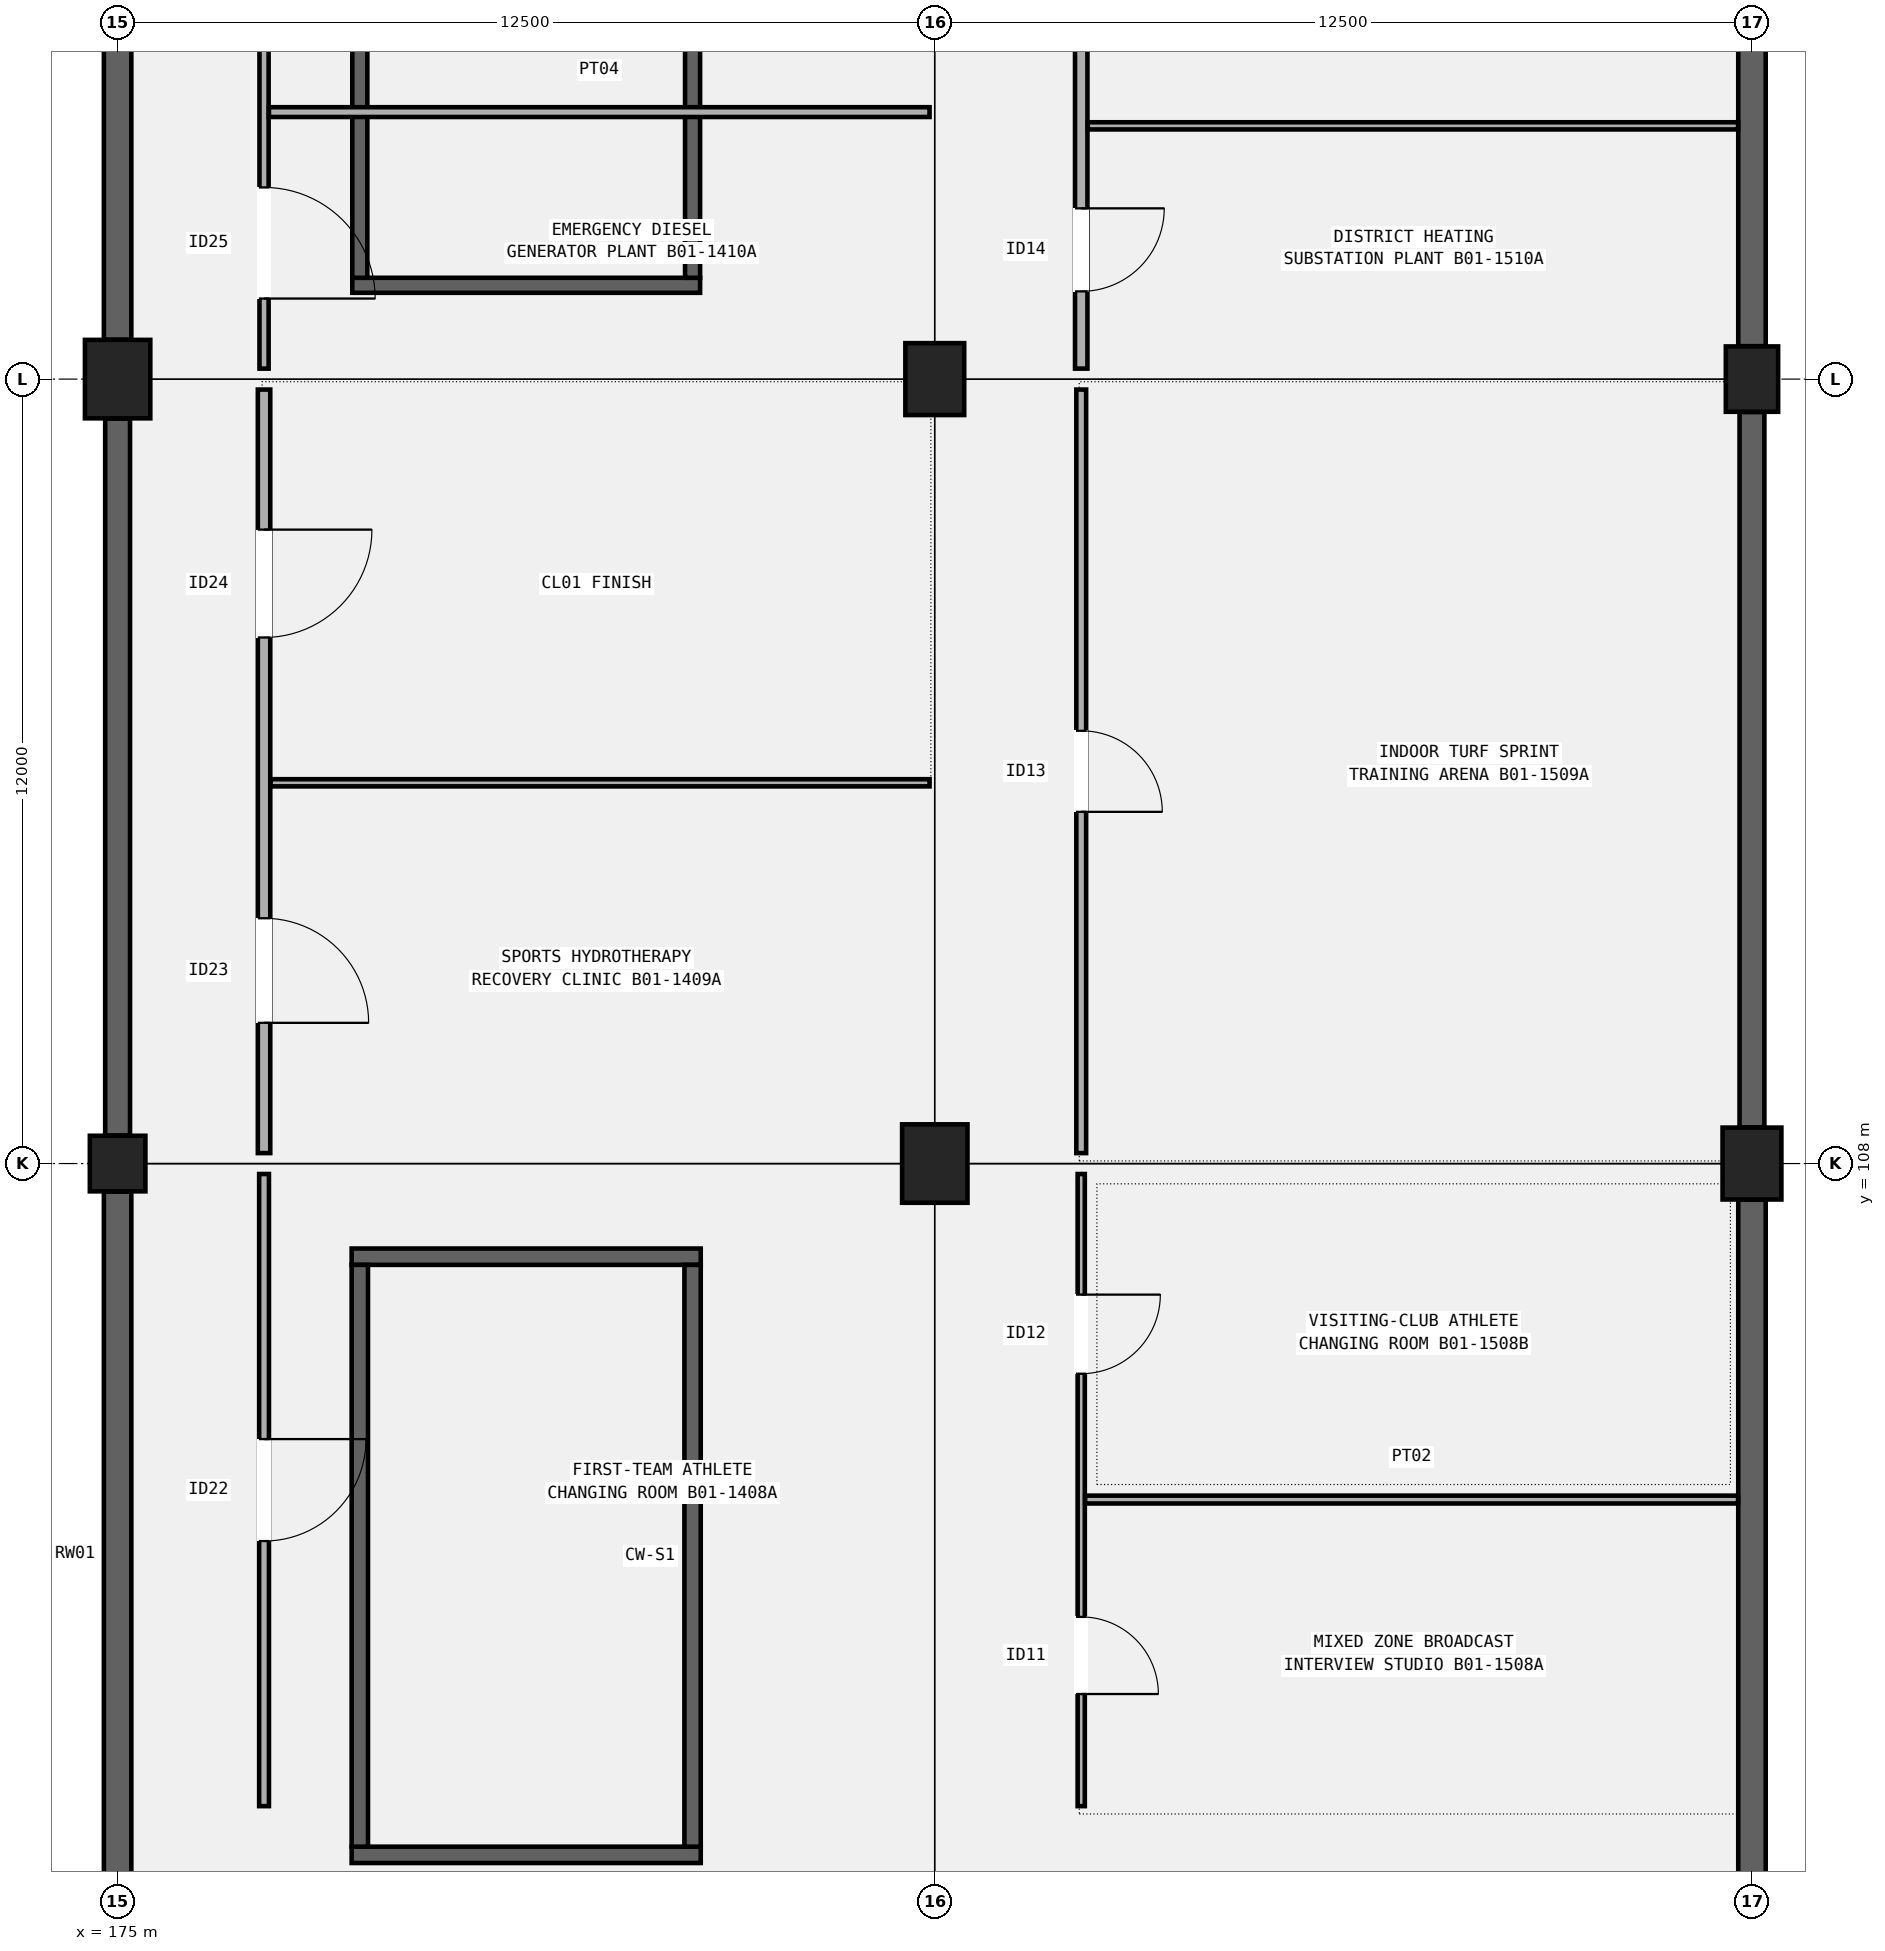
"""IFC4 building model, lengths in metres.
Left out: names, types, materials, properties, quantities, classifications, styles, units other than length and angle.
Written with IfcOpenShell. Run it as: python <this file> out.ifc"""

import sys

from ifc_helpers import new_model, si_unit, direction, frame, frame_2d, origin, origin_2d, place, context, subcontext, project, spatial, rectangle, circle, extrude, element, fill, save


model = new_model("IFC4")
c1 = context("Model", 3, precision=1e-05, world=origin(), true_north=direction((0.0, 1.0)))
c2 = subcontext(c1, "Body", "Model", "MODEL_VIEW")
j1 = project(units=[si_unit("LENGTHUNIT", "METRE"), si_unit("PLANEANGLEUNIT", "RADIAN")], contexts=[c1])
p1 = place(None, origin())
s1 = spatial("IfcSite", under=j1, at=p1, CompositionType="ELEMENT")
p2 = place(p1, origin())
s2 = spatial("IfcBuilding", under=s1, at=p2, CompositionType="ELEMENT")
p3 = place(p2, frame((0.0, 0.0, -4.8)))
s3 = spatial("IfcBuildingStorey", under=s2, at=p3, CompositionType="ELEMENT", Elevation=-4.8)
p4 = place(p3, frame((175.0, 108.0, 0.0), z_axis=(0.0, 0.0, 1.0), x_axis=(1.0, 0.0, 0.0)))
e1 = element("IfcColumn", 1, at=p4, inside=s3, PredefinedType="COLUMN", context=c2, shape_type="SweptSolid", body=[
    extrude(circle(Radius=0.425, at=origin_2d()), origin(), (0.0, 0.0, 1.0), 4.8),
])
for number, where, z_axis, x_axis in (
    (2, (175.0, 120.0, 0.0), (0.0, 0.0, 1.0), (1.0, 0.0, 0.0)),
    (3, (187.5, 108.0, 0.0), (0.0, 0.0, 1.0), (1.0, 0.0, 0.0)),
):
    element("IfcColumn", number, at=place(p3, frame(where, z_axis=z_axis, x_axis=x_axis)), inside=s3, PredefinedType="COLUMN", context=c2, shape_type="SweptSolid", body=[
        extrude(rectangle(XDim=1.0, YDim=1.2, at=origin_2d()), origin(), (0.0, 0.0, 1.0), 4.8),
    ])
for number, where, z_axis, x_axis in (
    (4, (187.5, 120.0, 0.0), (0.0, 0.0, 1.0), (1.0, 0.0, 0.0)),
    (5, (200.0, 108.0, 0.0), (0.0, 0.0, 1.0), (1.0, 0.0, 0.0)),
):
    element("IfcColumn", number, at=place(p3, frame(where, z_axis=z_axis, x_axis=x_axis)), inside=s3, PredefinedType="COLUMN", context=c2, shape_type="SweptSolid", body=[
        extrude(rectangle(XDim=0.9, YDim=1.1, at=origin_2d()), origin(), (0.0, 0.0, 1.0), 4.8),
    ])
p5 = place(p3, frame((200.0, 120.0, 0.0), z_axis=(0.0, 0.0, 1.0), x_axis=(1.0, 0.0, 0.0)))
e6 = element("IfcColumn", 6, at=p5, inside=s3, PredefinedType="COLUMN", context=c2, shape_type="SweptSolid", body=[
    extrude(rectangle(XDim=0.8, YDim=1.0, at=origin_2d()), origin(), (0.0, 0.0, 1.0), 4.8),
])
p6 = place(p3, frame((175.0, 96.504, 0.0), z_axis=(0.0, 0.0, 1.0), x_axis=(0.0, 1.0, 0.0)))
e7 = element("IfcWall", 7, at=p6, inside=s3, PredefinedType="STANDARD", context=c2, shape_type="SweptSolid", body=[
    extrude(rectangle(XDim=11.067, YDim=0.42, at=frame_2d((5.534, 0.0))), origin(), (0.0, 0.0, 1.0), 4.46),
])
p7 = place(p3, frame((175.0, 108.429, 0.0), z_axis=(0.0, 0.0, 1.0), x_axis=(0.0, 1.0, 0.0)))
e8 = element("IfcWall", 8, at=p7, inside=s3, PredefinedType="STANDARD", context=c2, shape_type="SweptSolid", body=[
    extrude(rectangle(XDim=10.967, YDim=0.38, at=frame_2d((5.483, 0.0))), origin(), (0.0, 0.0, 1.0), 4.46),
])
for number, where, z_axis, x_axis in (
    (9, (175.0, 120.604, 0.0), (0.0, 0.0, 1.0), (0.0, 1.0, 0.0)),
    (10, (200.0, 96.604, 0.0), (0.0, 0.0, 1.0), (0.0, 1.0, 0.0)),
):
    element("IfcWall", number, at=place(p3, frame(where, z_axis=z_axis, x_axis=x_axis)), inside=s3, PredefinedType="STANDARD", context=c2, shape_type="SweptSolid", body=[
        extrude(rectangle(XDim=10.842, YDim=0.42, at=frame_2d((5.421, 0.0))), origin(), (0.0, 0.0, 1.0), 4.46),
    ])
p8 = place(p3, frame((200.0, 108.554, 0.0), z_axis=(0.0, 0.0, 1.0), x_axis=(0.0, 1.0, 0.0)))
e11 = element("IfcWall", 11, at=p8, inside=s3, PredefinedType="STANDARD", context=c2, shape_type="SweptSolid", body=[
    extrude(rectangle(XDim=10.942, YDim=0.38, at=frame_2d((5.471, 0.0))), origin(), (0.0, 0.0, 1.0), 4.46),
])
p9 = place(p3, frame((200.0, 120.504, 0.0), z_axis=(0.0, 0.0, 1.0), x_axis=(0.0, 1.0, 0.0)))
e12 = element("IfcWall", 12, at=p9, inside=s3, PredefinedType="STANDARD", context=c2, shape_type="SweptSolid", body=[
    extrude(rectangle(XDim=11.067, YDim=0.42, at=frame_2d((5.534, 0.0))), origin(), (0.0, 0.0, 1.0), 4.46),
])
for number, where, z_axis, x_axis in (
    (13, (178.58, 97.425, 0.0), (0.0, 0.0, 1.0), (1.0, 0.0, 0.0)),
    (14, (178.58, 106.575, 0.0), (0.0, 0.0, 1.0), (1.0, 0.0, 0.0)),
):
    element("IfcWall", number, at=place(p3, frame(where, z_axis=z_axis, x_axis=x_axis)), inside=s3, PredefinedType="SHEAR", context=c2, shape_type="SweptSolid", body=[
        extrude(rectangle(XDim=5.34, YDim=0.25, at=frame_2d((2.67, 0.0))), origin(), (0.0, 0.0, 1.0), 4.5),
    ])
for number, where, z_axis, x_axis in (
    (15, (178.705, 97.55, 0.0), (0.0, 0.0, 1.0), (0.0, 1.0, 0.0)),
    (16, (183.795, 97.55, 0.0), (0.0, 0.0, 1.0), (0.0, 1.0, 0.0)),
):
    element("IfcWall", number, at=place(p3, frame(where, z_axis=z_axis, x_axis=x_axis)), inside=s3, PredefinedType="SHEAR", context=c2, shape_type="SweptSolid", body=[
        extrude(rectangle(XDim=8.9, YDim=0.25, at=frame_2d((4.45, 0.0))), origin(), (0.0, 0.0, 1.0), 4.5),
    ])
p10 = place(p3, frame((178.59, 121.435, 0.0), z_axis=(0.0, 0.0, 1.0), x_axis=(1.0, 0.0, 0.0)))
e17 = element("IfcWall", 17, at=p10, inside=s3, PredefinedType="SHEAR", context=c2, shape_type="SweptSolid", body=[
    extrude(rectangle(XDim=5.32, YDim=0.23, at=frame_2d((2.66, 0.0))), origin(), (0.0, 0.0, 1.0), 4.5),
])
for number, where, z_axis, x_axis in (
    (18, (178.705, 121.55, 0.0), (0.0, 0.0, 1.0), (0.0, 1.0, 0.0)),
    (19, (183.795, 121.55, 0.0), (0.0, 0.0, 1.0), (0.0, 1.0, 0.0)),
):
    element("IfcWall", number, at=place(p3, frame(where, z_axis=z_axis, x_axis=x_axis)), inside=s3, PredefinedType="SHEAR", context=c2, shape_type="SweptSolid", body=[
        extrude(rectangle(XDim=8.9, YDim=0.23, at=frame_2d((4.45, 0.0))), origin(), (0.0, 0.0, 1.0), 4.5),
    ])
p11 = place(p3, frame((177.24, 98.17, 0.0), z_axis=(0.0, 0.0, 1.0), x_axis=(0.0, 1.0, 0.0)))
e20 = element("IfcWall", 20, at=p11, inside=s3, PredefinedType="PARTITIONING", context=c2, shape_type="SweptSolid", body=[
    extrude(rectangle(XDim=9.67, YDim=0.15, at=frame_2d((4.835, 0.0))), origin(), (0.0, 0.0, 1.0), 3.92),
])
p12 = place(p11, frame((5.615, 0.0, 0.0), z_axis=(0.0, 0.0, 1.0), x_axis=(-1.0, 0.0, 0.0)))
e21 = element("IfcOpeningElement", 21, at=p12, cuts=e20, PredefinedType="OPENING", context=c2, shape_type="SweptSolid", body=[
    extrude(rectangle(XDim=1.56, YDim=2.26, at=frame_2d((0.78, 1.13))), frame((0.0, 0.085, 0.0), z_axis=(0.0, -1.0, 0.0), x_axis=(1.0, 0.0, 0.0)), (0.0, 0.0, 1.0), 0.17),
])
p13 = place(p3, frame((177.24, 108.16, 0.0), z_axis=(0.0, 0.0, 1.0), x_axis=(0.0, 1.0, 0.0)))
e22 = element("IfcWall", 22, at=p13, inside=s3, PredefinedType="PARTITIONING", context=c2, shape_type="SweptSolid", body=[
    extrude(rectangle(XDim=11.68, YDim=0.19, at=frame_2d((5.84, 0.0))), origin(), (0.0, 0.0, 1.0), 3.92),
])
p14 = place(p13, frame((3.593, 0.0, 0.0), z_axis=(0.0, 0.0, 1.0), x_axis=(-1.0, 0.0, 0.0)))
e23 = element("IfcOpeningElement", 23, at=p14, cuts=e22, PredefinedType="OPENING", context=c2, shape_type="SweptSolid", body=[
    extrude(rectangle(XDim=1.6, YDim=2.3, at=frame_2d((0.8, 1.15))), frame((0.0, 0.105, 0.0), z_axis=(0.0, -1.0, 0.0), x_axis=(1.0, 0.0, 0.0)), (0.0, 0.0, 1.0), 0.21),
])
p15 = place(p13, frame((9.537, 0.0, 0.0), z_axis=(0.0, 0.0, 1.0), x_axis=(-1.0, 0.0, 0.0)))
e24 = element("IfcOpeningElement", 24, at=p15, cuts=e22, PredefinedType="OPENING", context=c2, shape_type="SweptSolid", body=[
    extrude(rectangle(XDim=1.65, YDim=2.28, at=frame_2d((0.825, 1.14))), frame((0.0, 0.105, 0.0), z_axis=(0.0, -1.0, 0.0), x_axis=(1.0, 0.0, 0.0)), (0.0, 0.0, 1.0), 0.21),
])
p16 = place(p3, frame((177.34, 113.825, 0.0), z_axis=(0.0, 0.0, 1.0), x_axis=(1.0, 0.0, 0.0)))
e25 = element("IfcWall", 25, at=p16, inside=s3, PredefinedType="PARTITIONING", context=c2, shape_type="SweptSolid", body=[
    extrude(rectangle(XDim=10.08, YDim=0.11, at=frame_2d((5.04, 0.0))), origin(), (0.0, 0.0, 1.0), 3.92),
])
p17 = place(p3, frame((177.24, 120.16, 0.0), z_axis=(0.0, 0.0, 1.0), x_axis=(0.0, 1.0, 0.0)))
e26 = element("IfcWall", 26, at=p17, inside=s3, PredefinedType="PARTITIONING", context=c2, shape_type="SweptSolid", body=[
    extrude(rectangle(XDim=11.68, YDim=0.14, at=frame_2d((5.84, 0.0))), origin(), (0.0, 0.0, 1.0), 3.92),
])
p18 = place(p17, frame((2.772, 0.0, 0.0), z_axis=(0.0, 0.0, 1.0), x_axis=(-1.0, 0.0, 0.0)))
e27 = element("IfcOpeningElement", 27, at=p18, cuts=e26, PredefinedType="OPENING", context=c2, shape_type="SweptSolid", body=[
    extrude(rectangle(XDim=1.7, YDim=2.32, at=frame_2d((0.85, 1.16))), frame((0.0, 0.08, 0.0), z_axis=(0.0, -1.0, 0.0), x_axis=(1.0, 0.0, 0.0)), (0.0, 0.0, 1.0), 0.16),
])
p19 = place(p17, frame((8.722, 0.0, 0.0), z_axis=(0.0, 0.0, 1.0), x_axis=(-1.0, 0.0, 0.0)))
e28 = element("IfcOpeningElement", 28, at=p19, cuts=e26, PredefinedType="OPENING", context=c2, shape_type="SweptSolid", body=[
    extrude(rectangle(XDim=1.76, YDim=2.3, at=frame_2d((0.88, 1.15))), frame((0.0, 0.08, 0.0), z_axis=(0.0, -1.0, 0.0), x_axis=(1.0, 0.0, 0.0)), (0.0, 0.0, 1.0), 0.16),
])
p20 = place(p3, frame((177.315, 124.084, 0.0), z_axis=(0.0, 0.0, 1.0), x_axis=(1.0, 0.0, 0.0)))
e29 = element("IfcWall", 29, at=p20, inside=s3, PredefinedType="PARTITIONING", context=c2, shape_type="SweptSolid", body=[
    extrude(rectangle(XDim=10.105, YDim=0.15, at=frame_2d((5.052, 0.0))), origin(), (0.0, 0.0, 1.0), 3.92),
])
p21 = place(p3, frame((189.74, 98.17, 0.0), z_axis=(0.0, 0.0, 1.0), x_axis=(0.0, 1.0, 0.0)))
e30 = element("IfcWall", 30, at=p21, inside=s3, PredefinedType="PARTITIONING", context=c2, shape_type="SweptSolid", body=[
    extrude(rectangle(XDim=9.67, YDim=0.11, at=frame_2d((4.835, 0.0))), origin(), (0.0, 0.0, 1.0), 3.92),
])
p22 = place(p21, frame((2.895, 0.0, 0.0), z_axis=(0.0, 0.0, 1.0), x_axis=(-1.0, 0.0, 0.0)))
e31 = element("IfcOpeningElement", 31, at=p22, cuts=e30, PredefinedType="OPENING", context=c2, shape_type="SweptSolid", body=[
    extrude(rectangle(XDim=1.18, YDim=2.2, at=frame_2d((0.59, 1.1))), frame((0.0, 0.065, 0.0), z_axis=(0.0, -1.0, 0.0), x_axis=(1.0, 0.0, 0.0)), (0.0, 0.0, 1.0), 0.13),
])
p23 = place(p21, frame((7.825, 0.0, 0.0), z_axis=(0.0, 0.0, 1.0), x_axis=(-1.0, 0.0, 0.0)))
e32 = element("IfcOpeningElement", 32, at=p23, cuts=e30, PredefinedType="OPENING", context=c2, shape_type="SweptSolid", body=[
    extrude(rectangle(XDim=1.21, YDim=2.18, at=frame_2d((0.605, 1.09))), frame((0.0, 0.065, 0.0), z_axis=(0.0, -1.0, 0.0), x_axis=(1.0, 0.0, 0.0)), (0.0, 0.0, 1.0), 0.13),
])
p24 = place(p3, frame((189.8, 102.86, 0.0), z_axis=(0.0, 0.0, 1.0), x_axis=(1.0, 0.0, 0.0)))
e33 = element("IfcWall", 33, at=p24, inside=s3, PredefinedType="PARTITIONING", context=c2, shape_type="SweptSolid", body=[
    extrude(rectangle(XDim=9.988, YDim=0.12, at=frame_2d((4.994, 0.0))), origin(), (0.0, 0.0, 1.0), 3.92),
])
p25 = place(p3, frame((189.74, 108.16, 0.0), z_axis=(0.0, 0.0, 1.0), x_axis=(0.0, 1.0, 0.0)))
e34 = element("IfcWall", 34, at=p25, inside=s3, PredefinedType="PARTITIONING", context=c2, shape_type="SweptSolid", body=[
    extrude(rectangle(XDim=11.68, YDim=0.15, at=frame_2d((5.84, 0.0))), origin(), (0.0, 0.0, 1.0), 3.92),
])
p26 = place(p25, frame((6.46, 0.0, 0.0), z_axis=(0.0, 0.0, 1.0), x_axis=(-1.0, 0.0, 0.0)))
e35 = element("IfcOpeningElement", 35, at=p26, cuts=e34, PredefinedType="OPENING", context=c2, shape_type="SweptSolid", body=[
    extrude(rectangle(XDim=1.24, YDim=2.22, at=frame_2d((0.62, 1.11))), frame((0.0, 0.085, 0.0), z_axis=(0.0, -1.0, 0.0), x_axis=(1.0, 0.0, 0.0)), (0.0, 0.0, 1.0), 0.17),
])
p27 = place(p3, frame((189.74, 120.16, 0.0), z_axis=(0.0, 0.0, 1.0), x_axis=(0.0, 1.0, 0.0)))
e36 = element("IfcWall", 36, at=p27, inside=s3, PredefinedType="PARTITIONING", context=c2, shape_type="SweptSolid", body=[
    extrude(rectangle(XDim=11.68, YDim=0.19, at=frame_2d((5.84, 0.0))), origin(), (0.0, 0.0, 1.0), 3.92),
])
p28 = place(p27, frame((2.452, 0.0, 0.0), z_axis=(0.0, 0.0, 1.0), x_axis=(-1.0, 0.0, 0.0)))
e37 = element("IfcOpeningElement", 37, at=p28, cuts=e36, PredefinedType="OPENING", context=c2, shape_type="SweptSolid", body=[
    extrude(rectangle(XDim=1.27, YDim=2.2, at=frame_2d((0.635, 1.1))), frame((0.0, 0.105, 0.0), z_axis=(0.0, -1.0, 0.0), x_axis=(1.0, 0.0, 0.0)), (0.0, 0.0, 1.0), 0.21),
])
p29 = place(p27, frame((8.387, 0.0, 0.0), z_axis=(0.0, 0.0, 1.0), x_axis=(-1.0, 0.0, 0.0)))
e38 = element("IfcOpeningElement", 38, at=p29, cuts=e36, PredefinedType="OPENING", context=c2, shape_type="SweptSolid", body=[
    extrude(rectangle(XDim=1.3, YDim=2.24, at=frame_2d((0.65, 1.12))), frame((0.0, 0.105, 0.0), z_axis=(0.0, -1.0, 0.0), x_axis=(1.0, 0.0, 0.0)), (0.0, 0.0, 1.0), 0.21),
])
p30 = place(p3, frame((189.84, 123.874, 0.0), z_axis=(0.0, 0.0, 1.0), x_axis=(1.0, 0.0, 0.0)))
e39 = element("IfcWall", 39, at=p30, inside=s3, PredefinedType="PARTITIONING", context=c2, shape_type="SweptSolid", body=[
    extrude(rectangle(XDim=9.948, YDim=0.11, at=frame_2d((4.974, 0.0))), origin(), (0.0, 0.0, 1.0), 3.92),
])
p31 = place(p12, origin())
e40 = element("IfcDoor", 40, at=p31, inside=s3, OperationType="SINGLE_SWING_LEFT", PredefinedType="DOOR", context=c2, shape_type="SweptSolid", body=[
    extrude(rectangle(XDim=1.56, YDim=2.26, at=frame_2d((0.78, 1.13))), frame((0.0, 0.025, 0.0), z_axis=(0.0, -1.0, 0.0), x_axis=(1.0, 0.0, 0.0)), (0.0, 0.0, 1.0), 0.05),
])
fill(e21, e40)
p32 = place(p14, origin())
e41 = element("IfcDoor", 41, at=p32, inside=s3, OperationType="SINGLE_SWING_RIGHT", PredefinedType="DOOR", context=c2, shape_type="SweptSolid", body=[
    extrude(rectangle(XDim=1.6, YDim=2.3, at=frame_2d((0.8, 1.15))), frame((0.0, 0.025, 0.0), z_axis=(0.0, -1.0, 0.0), x_axis=(1.0, 0.0, 0.0)), (0.0, 0.0, 1.0), 0.05),
])
fill(e23, e41)
p33 = place(p15, origin())
e42 = element("IfcDoor", 42, at=p33, inside=s3, OperationType="SINGLE_SWING_LEFT", PredefinedType="DOOR", context=c2, shape_type="SweptSolid", body=[
    extrude(rectangle(XDim=1.65, YDim=2.28, at=frame_2d((0.825, 1.14))), frame((0.0, 0.025, 0.0), z_axis=(0.0, -1.0, 0.0), x_axis=(1.0, 0.0, 0.0)), (0.0, 0.0, 1.0), 0.05),
])
fill(e24, e42)
p34 = place(p18, origin())
e43 = element("IfcDoor", 43, at=p34, inside=s3, OperationType="SINGLE_SWING_RIGHT", PredefinedType="DOOR", context=c2, shape_type="SweptSolid", body=[
    extrude(rectangle(XDim=1.7, YDim=2.32, at=frame_2d((0.85, 1.16))), frame((0.0, 0.025, 0.0), z_axis=(0.0, -1.0, 0.0), x_axis=(1.0, 0.0, 0.0)), (0.0, 0.0, 1.0), 0.05),
])
fill(e27, e43)
p35 = place(p22, origin())
e44 = element("IfcDoor", 44, at=p35, inside=s3, OperationType="SINGLE_SWING_RIGHT", PredefinedType="DOOR", context=c2, shape_type="SweptSolid", body=[
    extrude(rectangle(XDim=1.18, YDim=2.2, at=frame_2d((0.59, 1.1))), frame((0.0, 0.025, 0.0), z_axis=(0.0, -1.0, 0.0), x_axis=(1.0, 0.0, 0.0)), (0.0, 0.0, 1.0), 0.05),
])
fill(e31, e44)
p36 = place(p23, origin())
e45 = element("IfcDoor", 45, at=p36, inside=s3, OperationType="SINGLE_SWING_LEFT", PredefinedType="DOOR", context=c2, shape_type="SweptSolid", body=[
    extrude(rectangle(XDim=1.21, YDim=2.18, at=frame_2d((0.605, 1.09))), frame((0.0, 0.025, 0.0), z_axis=(0.0, -1.0, 0.0), x_axis=(1.0, 0.0, 0.0)), (0.0, 0.0, 1.0), 0.05),
])
fill(e32, e45)
p37 = place(p26, origin())
e46 = element("IfcDoor", 46, at=p37, inside=s3, OperationType="SINGLE_SWING_RIGHT", PredefinedType="DOOR", context=c2, shape_type="SweptSolid", body=[
    extrude(rectangle(XDim=1.24, YDim=2.22, at=frame_2d((0.62, 1.11))), frame((0.0, 0.025, 0.0), z_axis=(0.0, -1.0, 0.0), x_axis=(1.0, 0.0, 0.0)), (0.0, 0.0, 1.0), 0.05),
])
fill(e35, e46)
p38 = place(p28, origin())
e47 = element("IfcDoor", 47, at=p38, inside=s3, OperationType="SINGLE_SWING_LEFT", PredefinedType="DOOR", context=c2, shape_type="SweptSolid", body=[
    extrude(rectangle(XDim=1.27, YDim=2.2, at=frame_2d((0.635, 1.1))), frame((0.0, 0.025, 0.0), z_axis=(0.0, -1.0, 0.0), x_axis=(1.0, 0.0, 0.0)), (0.0, 0.0, 1.0), 0.05),
])
fill(e37, e47)
save(model, sys.argv[1])
